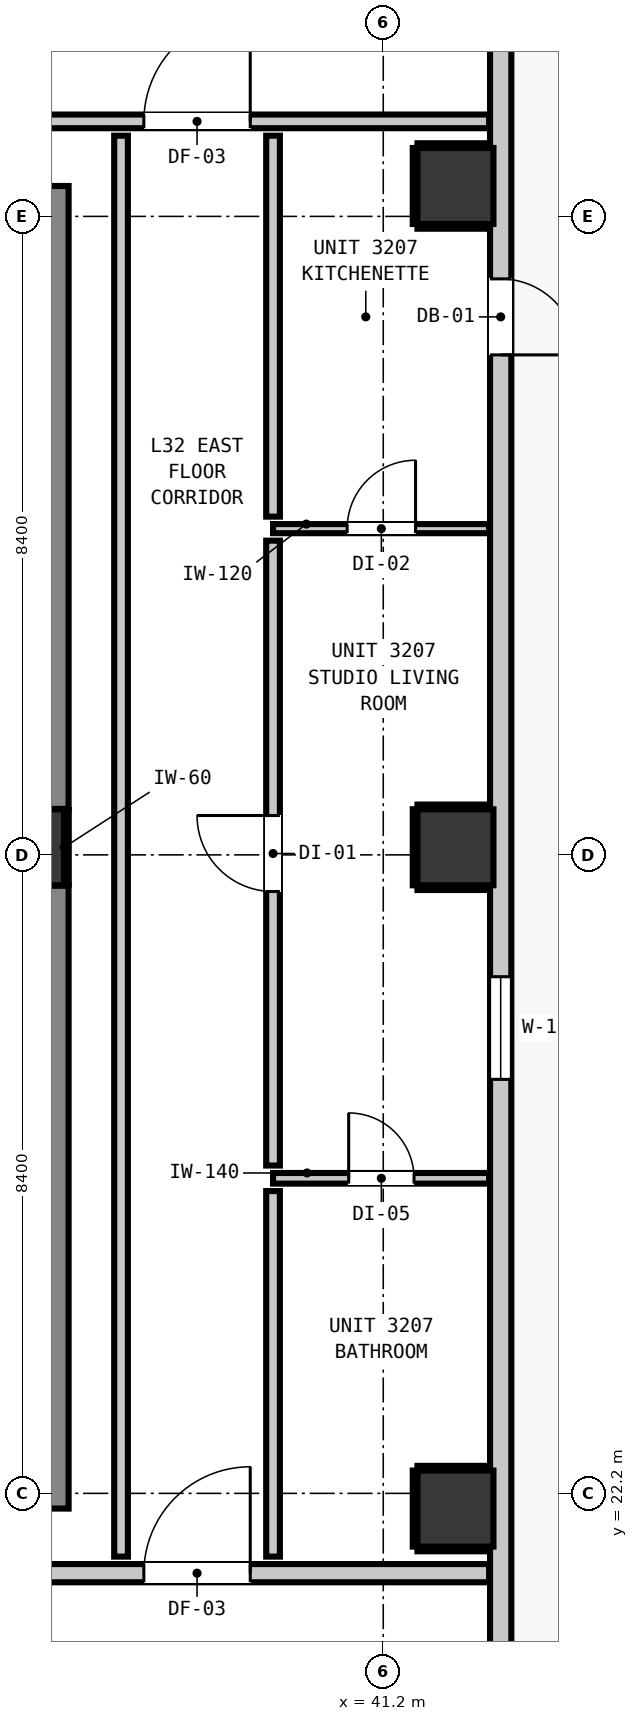
"""IFC4 building model, lengths in metres.
Left out: names, types, materials, properties, quantities, classifications, styles, units other than length and angle.
Written with IfcOpenShell. Run it as: python <this file> out.ifc"""

import sys

from ifc_helpers import new_model, si_unit, direction, frame, frame_2d, origin, origin_2d, place, context, subcontext, project, spatial, rectangle, extrude, element, fill, save


model = new_model("IFC4")
c1 = context("Model", 3, precision=1e-05, world=origin(), true_north=direction((0.0, 1.0)))
c2 = subcontext(c1, "Body", "Model", "MODEL_VIEW")
j1 = project(units=[si_unit("LENGTHUNIT", "METRE"), si_unit("PLANEANGLEUNIT", "RADIAN")], contexts=[c1])
p1 = place(None, origin())
s1 = spatial("IfcSite", under=j1, at=p1, CompositionType="ELEMENT")
p2 = place(p1, origin())
s2 = spatial("IfcBuilding", under=s1, at=p2, CompositionType="ELEMENT")
p3 = place(p2, frame((0.0, 0.0, 112.72)))
s3 = spatial("IfcBuildingStorey", under=s2, at=p3, CompositionType="ELEMENT", Elevation=112.72)
p4 = place(p3, frame((36.5, 30.7, 0.0), z_axis=(0.0, 0.0, 1.0), x_axis=(1.0, 0.0, 0.0)))
e1 = element("IfcColumn", 1, at=p4, inside=s3, PredefinedType="COLUMN", context=c2, shape_type="SweptSolid", body=[
    extrude(rectangle(XDim=1.0, YDim=1.0, at=origin_2d()), origin(), (0.0, 0.0, 1.0), 3.32),
])
p5 = place(p3, frame((36.56, 22.0, 0.0), z_axis=(0.0, 0.0, 1.0), x_axis=(0.0, 1.0, 0.0)))
e2 = element("IfcWall", 2, at=p5, inside=s3, PredefinedType="SHEAR", context=c2, shape_type="SweptSolid", body=[
    extrude(rectangle(XDim=8.195, YDim=1.0, at=frame_2d((4.098, 0.0))), origin(), (0.0, 0.0, 1.0), 3.32),
])
p6 = place(p3, frame((36.56, 31.205, 0.0), z_axis=(0.0, 0.0, 1.0), x_axis=(0.0, 1.0, 0.0)))
e3 = element("IfcWall", 3, at=p6, inside=s3, PredefinedType="SHEAR", context=c2, shape_type="SweptSolid", body=[
    extrude(rectangle(XDim=8.195, YDim=1.0, at=frame_2d((4.097, 0.0))), origin(), (0.0, 0.0, 1.0), 3.32),
])
for number, where, z_axis, x_axis in (
    (4, (42.15, 22.0, 0.0), (0.0, 0.0, 1.0), (1.0, 0.0, 0.0)),
    (5, (42.15, 30.7, 0.0), (0.0, 0.0, 1.0), (1.0, 0.0, 0.0)),
    (6, (42.15, 39.4, 0.0), (0.0, 0.0, 1.0), (1.0, 0.0, 0.0)),
):
    element("IfcColumn", number, at=place(p3, frame(where, z_axis=z_axis, x_axis=x_axis)), inside=s3, PredefinedType="COLUMN", context=c2, shape_type="SweptSolid", body=[
        extrude(rectangle(XDim=1.0, YDim=1.0, at=origin_2d()), origin(), (0.0, 0.0, 1.0), 3.32),
    ])
p7 = place(p3, frame((42.745, 43.645, 0.0), z_axis=(0.0, 0.0, 1.0), x_axis=(0.0, -1.0, 0.0)))
e7 = element("IfcWall", 7, at=p7, inside=s3, PredefinedType="STANDARD", context=c2, shape_type="SweptSolid", body=[
    extrude(rectangle(XDim=32.29, YDim=0.28, at=frame_2d((16.145, 0.0))), origin(), (0.0, 0.0, 1.0), 3.08),
])
p8 = place(p7, frame((5.467, 0.0, 0.0)))
e8 = element("IfcOpeningElement", 8, at=p8, cuts=e7, PredefinedType="OPENING", context=c2, shape_type="SweptSolid", body=[
    extrude(rectangle(XDim=1.0, YDim=2.15, at=frame_2d((0.5, 1.075))), frame((0.0, 0.15, 0.0), z_axis=(0.0, -1.0, 0.0), x_axis=(1.0, 0.0, 0.0)), (0.0, 0.0, 1.0), 0.3),
])
p9 = place(p7, frame((0.318, 0.0, 0.85)))
e9 = element("IfcOpeningElement", 9, at=p9, cuts=e7, PredefinedType="OPENING", context=c2, shape_type="SweptSolid", body=[
    extrude(rectangle(XDim=1.05, YDim=1.65, at=frame_2d((0.525, 0.825))), frame((0.0, 0.15, 0.0), z_axis=(0.0, -1.0, 0.0), x_axis=(1.0, 0.0, 0.0)), (0.0, 0.0, 1.0), 0.3),
])
p10 = place(p7, frame((14.648, 0.0, 0.85)))
e10 = element("IfcOpeningElement", 10, at=p10, cuts=e7, PredefinedType="OPENING", context=c2, shape_type="SweptSolid", body=[
    extrude(rectangle(XDim=1.35, YDim=1.85, at=frame_2d((0.675, 0.925))), frame((0.0, 0.15, 0.0), z_axis=(0.0, -1.0, 0.0), x_axis=(1.0, 0.0, 0.0)), (0.0, 0.0, 1.0), 0.3),
])
p11 = place(p3, frame((3.207, 21.15, 0.0), z_axis=(0.0, 0.0, 1.0), x_axis=(1.0, 0.0, 0.0)))
e11 = element("IfcWall", 11, at=p11, inside=s3, PredefinedType="PARTITIONING", context=c2, shape_type="SweptSolid", body=[
    extrude(rectangle(XDim=39.386, YDim=0.24, at=frame_2d((19.693, 0.0))), origin(), (0.0, 0.0, 1.0), 3.08),
])
p12 = place(p11, frame((15.003, 0.0, 0.0)))
e12 = element("IfcOpeningElement", 12, at=p12, cuts=e11, PredefinedType="OPENING", context=c2, shape_type="SweptSolid", body=[
    extrude(rectangle(XDim=1.1, YDim=2.15, at=frame_2d((0.55, 1.075))), frame((0.0, 0.13, 0.0), z_axis=(0.0, -1.0, 0.0), x_axis=(1.0, 0.0, 0.0)), (0.0, 0.0, 1.0), 0.26),
])
p13 = place(p11, frame((7.243, 0.0, 0.0)))
e13 = element("IfcOpeningElement", 13, at=p13, cuts=e11, PredefinedType="OPENING", context=c2, shape_type="SweptSolid", body=[
    extrude(rectangle(XDim=1.4, YDim=2.15, at=frame_2d((0.7, 1.075))), frame((0.0, 0.13, 0.0), z_axis=(0.0, -1.0, 0.0), x_axis=(1.0, 0.0, 0.0)), (0.0, 0.0, 1.0), 0.26),
])
p14 = place(p11, frame((34.843, 0.0, 0.0)))
e14 = element("IfcOpeningElement", 14, at=p14, cuts=e11, PredefinedType="OPENING", context=c2, shape_type="SweptSolid", body=[
    extrude(rectangle(XDim=1.4, YDim=2.15, at=frame_2d((0.7, 1.075))), frame((0.0, 0.13, 0.0), z_axis=(0.0, -1.0, 0.0), x_axis=(1.0, 0.0, 0.0)), (0.0, 0.0, 1.0), 0.26),
])
p15 = place(p3, frame((12.979, 40.25, 0.0), z_axis=(0.0, 0.0, 1.0), x_axis=(1.0, 0.0, 0.0)))
e15 = element("IfcWall", 15, at=p15, inside=s3, PredefinedType="PARTITIONING", context=c2, shape_type="SweptSolid", body=[
    extrude(rectangle(XDim=29.614, YDim=0.18, at=frame_2d((14.807, 0.0))), origin(), (0.0, 0.0, 1.0), 3.08),
])
p16 = place(p15, frame((4.456, 0.0, 0.0)))
e16 = element("IfcOpeningElement", 16, at=p16, cuts=e15, PredefinedType="OPENING", context=c2, shape_type="SweptSolid", body=[
    extrude(rectangle(XDim=1.4, YDim=2.15, at=frame_2d((0.7, 1.075))), frame((0.0, 0.1, 0.0), z_axis=(0.0, -1.0, 0.0), x_axis=(1.0, 0.0, 0.0)), (0.0, 0.0, 1.0), 0.2),
])
p17 = place(p15, frame((25.071, 0.0, 0.0)))
e17 = element("IfcOpeningElement", 17, at=p17, cuts=e15, PredefinedType="OPENING", context=c2, shape_type="SweptSolid", body=[
    extrude(rectangle(XDim=1.4, YDim=2.15, at=frame_2d((0.7, 1.075))), frame((0.0, 0.1, 0.0), z_axis=(0.0, -1.0, 0.0), x_axis=(1.0, 0.0, 0.0)), (0.0, 0.0, 1.0), 0.2),
])
p18 = place(p3, frame((39.75, 26.345, 0.0), z_axis=(0.0, 0.0, 1.0), x_axis=(1.0, 0.0, 0.0)))
e18 = element("IfcWall", 18, at=p18, inside=s3, PredefinedType="PARTITIONING", context=c2, shape_type="SweptSolid", body=[
    extrude(rectangle(XDim=2.843, YDim=0.14, at=frame_2d((1.421, 0.0))), origin(), (0.0, 0.0, 1.0), 3.08),
])
p19 = place(p18, frame((0.995, 0.0, 0.0)))
e19 = element("IfcOpeningElement", 19, at=p19, cuts=e18, PredefinedType="OPENING", context=c2, shape_type="SweptSolid", body=[
    extrude(rectangle(XDim=0.86, YDim=2.02, at=frame_2d((0.43, 1.01))), frame((0.0, 0.08, 0.0), z_axis=(0.0, -1.0, 0.0), x_axis=(1.0, 0.0, 0.0)), (0.0, 0.0, 1.0), 0.16),
])
p20 = place(p3, frame((39.75, 34.892, 0.0), z_axis=(0.0, 0.0, 1.0), x_axis=(1.0, 0.0, 0.0)))
e20 = element("IfcWall", 20, at=p20, inside=s3, PredefinedType="PARTITIONING", context=c2, shape_type="SweptSolid", body=[
    extrude(rectangle(XDim=2.843, YDim=0.12, at=frame_2d((1.421, 0.0))), origin(), (0.0, 0.0, 1.0), 3.08),
])
p21 = place(p20, frame((0.975, 0.0, 0.0)))
e21 = element("IfcOpeningElement", 21, at=p21, cuts=e20, PredefinedType="OPENING", context=c2, shape_type="SweptSolid", body=[
    extrude(rectangle(XDim=0.9, YDim=2.1, at=frame_2d((0.45, 1.05))), frame((0.0, 0.07, 0.0), z_axis=(0.0, -1.0, 0.0), x_axis=(1.0, 0.0, 0.0)), (0.0, 0.0, 1.0), 0.14),
])
p22 = place(p3, frame((37.75, 21.368, 0.0), z_axis=(0.0, 0.0, 1.0), x_axis=(0.0, 1.0, 0.0)))
e22 = element("IfcWall", 22, at=p22, inside=s3, PredefinedType="PARTITIONING", context=c2, shape_type="SweptSolid", body=[
    extrude(rectangle(XDim=18.694, YDim=0.18, at=frame_2d((9.347, 0.0))), origin(), (0.0, 0.0, 1.0), 3.08),
])
p23 = place(p3, frame((39.75, 21.368, 0.0), z_axis=(0.0, 0.0, 1.0), x_axis=(0.0, 1.0, 0.0)))
e23 = element("IfcWall", 23, at=p23, inside=s3, PredefinedType="PARTITIONING", context=c2, shape_type="SweptSolid", body=[
    extrude(rectangle(XDim=4.809, YDim=0.18, at=frame_2d((2.405, 0.0))), origin(), (0.0, 0.0, 1.0), 3.08),
])
p24 = place(p3, frame((39.75, 26.513, 0.0), z_axis=(0.0, 0.0, 1.0), x_axis=(0.0, 1.0, 0.0)))
e24 = element("IfcWall", 24, at=p24, inside=s3, PredefinedType="PARTITIONING", context=c2, shape_type="SweptSolid", body=[
    extrude(rectangle(XDim=8.221, YDim=0.18, at=frame_2d((4.11, 0.0))), origin(), (0.0, 0.0, 1.0), 3.08),
])
p25 = place(p24, frame((3.605, 0.0, 0.0)))
e25 = element("IfcOpeningElement", 25, at=p25, cuts=e24, PredefinedType="OPENING", context=c2, shape_type="SweptSolid", body=[
    extrude(rectangle(XDim=1.0, YDim=2.15, at=frame_2d((0.5, 1.075))), frame((0.0, 0.1, 0.0), z_axis=(0.0, -1.0, 0.0), x_axis=(1.0, 0.0, 0.0)), (0.0, 0.0, 1.0), 0.2),
])
p26 = place(p3, frame((39.75, 35.05, 0.0), z_axis=(0.0, 0.0, 1.0), x_axis=(0.0, 1.0, 0.0)))
e26 = element("IfcWall", 26, at=p26, inside=s3, PredefinedType="PARTITIONING", context=c2, shape_type="SweptSolid", body=[
    extrude(rectangle(XDim=5.012, YDim=0.18, at=frame_2d((2.506, 0.0))), origin(), (0.0, 0.0, 1.0), 3.08),
])
p27 = place(p3, frame((37.032, 30.21, 0.0), z_axis=(0.0, 0.0, 1.0), x_axis=(0.0, 1.0, 0.0)))
e27 = element("IfcWall", 27, at=p27, inside=s3, PredefinedType="PARTITIONING", context=c2, shape_type="SweptSolid", body=[
    extrude(rectangle(XDim=0.98, YDim=0.06, at=frame_2d((0.49, 0.0))), origin(), (0.0, 0.0, 1.0), 1.45),
])
for number, where, z_axis, x_axis in (
    (28, (41.65, 21.468, 0.0), (0.0, 0.0, 1.0), (1.0, 0.0, 0.0)),
    (29, (41.65, 22.532, 0.0), (0.0, 0.0, 1.0), (1.0, 0.0, 0.0)),
):
    element("IfcWall", number, at=place(p3, frame(where, z_axis=z_axis, x_axis=x_axis)), inside=s3, PredefinedType="PARTITIONING", context=c2, shape_type="SweptSolid", body=[
        extrude(rectangle(XDim=0.94, YDim=0.06, at=frame_2d((0.47, 0.0))), origin(), (0.0, 0.0, 1.0), 1.45),
    ])
p28 = place(p3, frame((41.618, 21.5, 0.0), z_axis=(0.0, 0.0, 1.0), x_axis=(0.0, 1.0, 0.0)))
e30 = element("IfcWall", 30, at=p28, inside=s3, PredefinedType="PARTITIONING", context=c2, shape_type="SweptSolid", body=[
    extrude(rectangle(XDim=1.0, YDim=0.06, at=frame_2d((0.5, 0.0))), origin(), (0.0, 0.0, 1.0), 1.45),
])
for number, where, z_axis, x_axis in (
    (31, (41.65, 30.168, 0.0), (0.0, 0.0, 1.0), (1.0, 0.0, 0.0)),
    (32, (41.65, 31.232, 0.0), (0.0, 0.0, 1.0), (1.0, 0.0, 0.0)),
):
    element("IfcWall", number, at=place(p3, frame(where, z_axis=z_axis, x_axis=x_axis)), inside=s3, PredefinedType="PARTITIONING", context=c2, shape_type="SweptSolid", body=[
        extrude(rectangle(XDim=0.94, YDim=0.06, at=frame_2d((0.47, 0.0))), origin(), (0.0, 0.0, 1.0), 1.45),
    ])
p29 = place(p3, frame((41.618, 30.2, 0.0), z_axis=(0.0, 0.0, 1.0), x_axis=(0.0, 1.0, 0.0)))
e33 = element("IfcWall", 33, at=p29, inside=s3, PredefinedType="PARTITIONING", context=c2, shape_type="SweptSolid", body=[
    extrude(rectangle(XDim=1.0, YDim=0.06, at=frame_2d((0.5, 0.0))), origin(), (0.0, 0.0, 1.0), 1.45),
])
for number, where, z_axis, x_axis in (
    (34, (41.65, 38.868, 0.0), (0.0, 0.0, 1.0), (1.0, 0.0, 0.0)),
    (35, (41.65, 39.932, 0.0), (0.0, 0.0, 1.0), (1.0, 0.0, 0.0)),
):
    element("IfcWall", number, at=place(p3, frame(where, z_axis=z_axis, x_axis=x_axis)), inside=s3, PredefinedType="PARTITIONING", context=c2, shape_type="SweptSolid", body=[
        extrude(rectangle(XDim=0.94, YDim=0.06, at=frame_2d((0.47, 0.0))), origin(), (0.0, 0.0, 1.0), 1.45),
    ])
p30 = place(p3, frame((41.618, 38.9, 0.0), z_axis=(0.0, 0.0, 1.0), x_axis=(0.0, 1.0, 0.0)))
e36 = element("IfcWall", 36, at=p30, inside=s3, PredefinedType="PARTITIONING", context=c2, shape_type="SweptSolid", body=[
    extrude(rectangle(XDim=1.0, YDim=0.06, at=frame_2d((0.5, 0.0))), origin(), (0.0, 0.0, 1.0), 1.45),
])
p31 = place(p8, origin())
e37 = element("IfcDoor", 37, at=p31, inside=s3, OperationType="SINGLE_SWING_RIGHT", PredefinedType="DOOR", context=c2, shape_type="SweptSolid", body=[
    extrude(rectangle(XDim=1.0, YDim=2.15, at=frame_2d((0.5, 1.075))), frame((0.0, 0.025, 0.0), z_axis=(0.0, -1.0, 0.0), x_axis=(1.0, 0.0, 0.0)), (0.0, 0.0, 1.0), 0.05),
])
fill(e8, e37)
p32 = place(p10, origin())
e38 = element("IfcWindow", 38, at=p32, inside=s3, PartitioningType="SINGLE_PANEL", PredefinedType="WINDOW", context=c2, shape_type="SweptSolid", body=[
    extrude(rectangle(XDim=1.35, YDim=1.85, at=frame_2d((0.675, 0.925))), frame((0.0, 0.03, 0.0), z_axis=(0.0, -1.0, 0.0), x_axis=(1.0, 0.0, 0.0)), (0.0, 0.0, 1.0), 0.06),
])
fill(e10, e38)
p33 = place(p14, origin())
e39 = element("IfcDoor", 39, at=p33, inside=s3, OperationType="SINGLE_SWING_RIGHT", PredefinedType="DOOR", context=c2, shape_type="SweptSolid", body=[
    extrude(rectangle(XDim=1.4, YDim=2.15, at=frame_2d((0.7, 1.075))), frame((0.0, 0.025, 0.0), z_axis=(0.0, -1.0, 0.0), x_axis=(1.0, 0.0, 0.0)), (0.0, 0.0, 1.0), 0.05),
])
fill(e14, e39)
p34 = place(p17, origin())
e40 = element("IfcDoor", 40, at=p34, inside=s3, OperationType="SINGLE_SWING_RIGHT", PredefinedType="DOOR", context=c2, shape_type="SweptSolid", body=[
    extrude(rectangle(XDim=1.4, YDim=2.15, at=frame_2d((0.7, 1.075))), frame((0.0, 0.025, 0.0), z_axis=(0.0, -1.0, 0.0), x_axis=(1.0, 0.0, 0.0)), (0.0, 0.0, 1.0), 0.05),
])
fill(e17, e40)
p35 = place(p25, origin())
e41 = element("IfcDoor", 41, at=p35, inside=s3, OperationType="SINGLE_SWING_RIGHT", PredefinedType="DOOR", context=c2, shape_type="SweptSolid", body=[
    extrude(rectangle(XDim=1.0, YDim=2.15, at=frame_2d((0.5, 1.075))), frame((0.0, 0.025, 0.0), z_axis=(0.0, -1.0, 0.0), x_axis=(1.0, 0.0, 0.0)), (0.0, 0.0, 1.0), 0.05),
])
fill(e25, e41)
p36 = place(p19, origin())
e42 = element("IfcDoor", 42, at=p36, inside=s3, OperationType="SINGLE_SWING_LEFT", PredefinedType="DOOR", context=c2, shape_type="SweptSolid", body=[
    extrude(rectangle(XDim=0.86, YDim=2.02, at=frame_2d((0.43, 1.01))), frame((0.0, 0.025, 0.0), z_axis=(0.0, -1.0, 0.0), x_axis=(1.0, 0.0, 0.0)), (0.0, 0.0, 1.0), 0.05),
])
fill(e19, e42)
p37 = place(p21, origin())
e43 = element("IfcDoor", 43, at=p37, inside=s3, OperationType="SINGLE_SWING_RIGHT", PredefinedType="DOOR", context=c2, shape_type="SweptSolid", body=[
    extrude(rectangle(XDim=0.9, YDim=2.1, at=frame_2d((0.45, 1.05))), frame((0.0, 0.025, 0.0), z_axis=(0.0, -1.0, 0.0), x_axis=(1.0, 0.0, 0.0)), (0.0, 0.0, 1.0), 0.05),
])
fill(e21, e43)
save(model, sys.argv[1])
